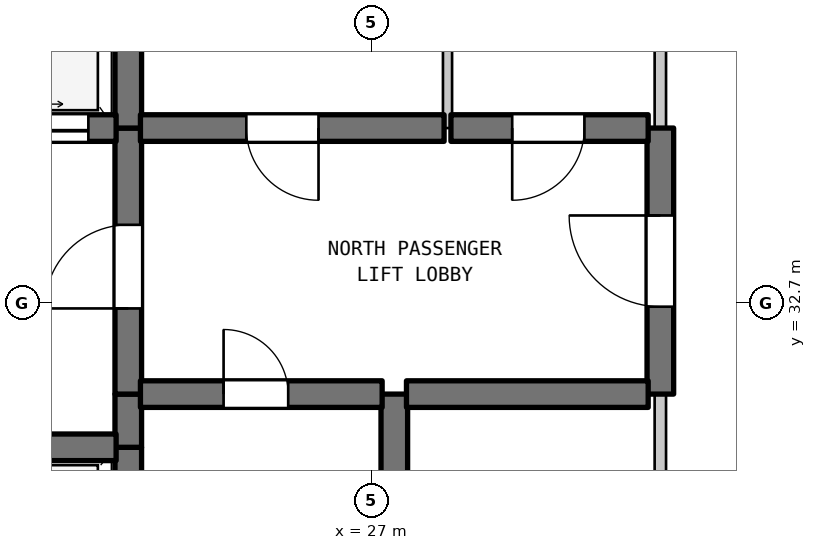
"""IFC4 building model, lengths in metres.
Left out: names, types, materials, properties, quantities, classifications, styles, units other than length and angle.
Written with IfcOpenShell. Run it as: python <this file> out.ifc"""

import sys

from ifc_helpers import new_model, si_unit, direction, frame, frame_2d, origin, place, context, subcontext, project, spatial, rectangle, extrude, element, fill, save


model = new_model("IFC4")
c1 = context("Model", 3, precision=1e-05, world=origin(), true_north=direction((0.0, 1.0)))
c2 = subcontext(c1, "Body", "Model", "MODEL_VIEW")
j1 = project(units=[si_unit("LENGTHUNIT", "METRE"), si_unit("PLANEANGLEUNIT", "RADIAN")], contexts=[c1])
p1 = place(None, origin())
s1 = spatial("IfcSite", under=j1, at=p1, CompositionType="ELEMENT")
p2 = place(p1, origin())
s2 = spatial("IfcBuilding", under=s1, at=p2, CompositionType="ELEMENT")
p3 = place(p2, frame((0.0, 0.0, 242.8)))
s3 = spatial("IfcBuildingStorey", under=s2, at=p3, CompositionType="ELEMENT", Elevation=242.8)
p4 = place(p3, frame((23.8, 28.2, 0.0), z_axis=(0.0, 0.0, 1.0), x_axis=(0.0, 1.0, 0.0)))
e1 = element("IfcWall", 1, at=p4, inside=s3, PredefinedType="SHEAR", context=c2, shape_type="SweptSolid", body=[
    extrude(rectangle(XDim=2.6, YDim=0.35, at=frame_2d((1.3, 0.0))), origin(), (0.0, 0.0, 1.0), 4.19),
])
p5 = place(p3, frame((23.8, 30.8, 0.0), z_axis=(0.0, 0.0, 1.0), x_axis=(0.0, 1.0, 0.0)))
e2 = element("IfcWall", 2, at=p5, inside=s3, PredefinedType="SHEAR", context=c2, shape_type="SweptSolid", body=[
    extrude(rectangle(XDim=0.7, YDim=0.35, at=frame_2d((0.35, 0.0))), origin(), (0.0, 0.0, 1.0), 4.19),
])
p6 = place(p3, frame((23.8, 31.5, 0.0), z_axis=(0.0, 0.0, 1.0), x_axis=(0.0, 1.0, 0.0)))
e3 = element("IfcWall", 3, at=p6, inside=s3, PredefinedType="SHEAR", context=c2, shape_type="SweptSolid", body=[
    extrude(rectangle(XDim=3.5, YDim=0.35, at=frame_2d((1.75, 0.0))), origin(), (0.0, 0.0, 1.0), 4.19),
])
p7 = place(p6, frame((1.127, 0.0, 0.0)))
e4 = element("IfcOpeningElement", 4, at=p7, cuts=e3, PredefinedType="OPENING", context=c2, shape_type="SweptSolid", body=[
    extrude(rectangle(XDim=1.1, YDim=2.15, at=frame_2d((0.55, 1.075))), frame((0.0, 0.185, 0.0), z_axis=(0.0, -1.0, 0.0), x_axis=(1.0, 0.0, 0.0)), (0.0, 0.0, 1.0), 0.37),
])
p8 = place(p3, frame((23.8, 35.0, 0.0), z_axis=(0.0, 0.0, 1.0), x_axis=(0.0, 1.0, 0.0)))
e5 = element("IfcWall", 5, at=p8, inside=s3, PredefinedType="SHEAR", context=c2, shape_type="SweptSolid", body=[
    extrude(rectangle(XDim=2.9, YDim=0.35, at=frame_2d((1.45, 0.0))), origin(), (0.0, 0.0, 1.0), 4.19),
])
p9 = place(p3, frame((27.3, 28.9, 0.0), z_axis=(0.0, 0.0, 1.0), x_axis=(0.0, 1.0, 0.0)))
e6 = element("IfcWall", 6, at=p9, inside=s3, PredefinedType="SHEAR", context=c2, shape_type="SweptSolid", body=[
    extrude(rectangle(XDim=2.6, YDim=0.35, at=frame_2d((1.3, 0.0))), origin(), (0.0, 0.0, 1.0), 4.19),
])
p10 = place(p3, frame((28.0, 35.0, 0.0), z_axis=(0.0, 0.0, 1.0), x_axis=(0.0, 1.0, 0.0)))
e7 = element("IfcWall", 7, at=p10, inside=s3, PredefinedType="PARTITIONING", context=c2, shape_type="SweptSolid", body=[
    extrude(rectangle(XDim=2.9, YDim=0.12, at=frame_2d((1.45, 0.0))), origin(), (0.0, 0.0, 1.0), 4.19),
])
p11 = place(p3, frame((30.8, 28.9, 0.0), z_axis=(0.0, 0.0, 1.0), x_axis=(0.0, 1.0, 0.0)))
e8 = element("IfcWall", 8, at=p11, inside=s3, PredefinedType="STANDARD", context=c2, shape_type="SweptSolid", body=[
    extrude(rectangle(XDim=2.6, YDim=0.15, at=frame_2d((1.3, 0.0))), origin(), (0.0, 0.0, 1.0), 4.19),
])
p12 = place(p3, frame((30.8, 31.5, 0.0), z_axis=(0.0, 0.0, 1.0), x_axis=(0.0, 1.0, 0.0)))
e9 = element("IfcWall", 9, at=p12, inside=s3, PredefinedType="SHEAR", context=c2, shape_type="SweptSolid", body=[
    extrude(rectangle(XDim=3.5, YDim=0.35, at=frame_2d((1.75, 0.0))), origin(), (0.0, 0.0, 1.0), 4.19),
])
p13 = place(p12, frame((1.15, 0.0, 0.0)))
e10 = element("IfcOpeningElement", 10, at=p13, cuts=e9, PredefinedType="OPENING", context=c2, shape_type="SweptSolid", body=[
    extrude(rectangle(XDim=1.2, YDim=2.2, at=frame_2d((0.6, 1.1))), frame((0.0, 0.185, 0.0), z_axis=(0.0, -1.0, 0.0), x_axis=(1.0, 0.0, 0.0)), (0.0, 0.0, 1.0), 0.37),
])
p14 = place(p3, frame((30.8, 35.0, 0.0), z_axis=(0.0, 0.0, 1.0), x_axis=(0.0, 1.0, 0.0)))
e11 = element("IfcWall", 11, at=p14, inside=s3, PredefinedType="STANDARD", context=c2, shape_type="SweptSolid", body=[
    extrude(rectangle(XDim=2.9, YDim=0.15, at=frame_2d((1.45, 0.0))), origin(), (0.0, 0.0, 1.0), 4.19),
])
p15 = place(p3, frame((19.16, 30.8, 0.0), z_axis=(0.0, 0.0, 1.0), x_axis=(1.0, 0.0, 0.0)))
e12 = element("IfcWall", 12, at=p15, inside=s3, PredefinedType="SHEAR", context=c2, shape_type="SweptSolid", body=[
    extrude(rectangle(XDim=4.48, YDim=0.35, at=frame_2d((2.24, 0.0))), origin(), (0.0, 0.0, 1.0), 4.19),
])
p16 = place(p3, frame((23.96, 31.5, 0.0), z_axis=(0.0, 0.0, 1.0), x_axis=(1.0, 0.0, 0.0)))
e13 = element("IfcWall", 13, at=p16, inside=s3, PredefinedType="SHEAR", context=c2, shape_type="SweptSolid", body=[
    extrude(rectangle(XDim=3.18, YDim=0.35, at=frame_2d((1.59, 0.0))), origin(), (0.0, 0.0, 1.0), 4.19),
])
p17 = place(p16, frame((1.094, 0.0, 0.0)))
e14 = element("IfcOpeningElement", 14, at=p17, cuts=e13, PredefinedType="OPENING", context=c2, shape_type="SweptSolid", body=[
    extrude(rectangle(XDim=0.85, YDim=2.1, at=frame_2d((0.425, 1.05))), frame((0.0, 0.185, 0.0), z_axis=(0.0, -1.0, 0.0), x_axis=(1.0, 0.0, 0.0)), (0.0, 0.0, 1.0), 0.37),
])
p18 = place(p3, frame((27.46, 31.5, 0.0), z_axis=(0.0, 0.0, 1.0), x_axis=(1.0, 0.0, 0.0)))
e15 = element("IfcWall", 15, at=p18, inside=s3, PredefinedType="SHEAR", context=c2, shape_type="SweptSolid", body=[
    extrude(rectangle(XDim=3.18, YDim=0.35, at=frame_2d((1.59, 0.0))), origin(), (0.0, 0.0, 1.0), 4.19),
])
p19 = place(p3, frame((19.16, 35.0, 0.0), z_axis=(0.0, 0.0, 1.0), x_axis=(1.0, 0.0, 0.0)))
e16 = element("IfcWall", 16, at=p19, inside=s3, PredefinedType="SHEAR", context=c2, shape_type="SweptSolid", body=[
    extrude(rectangle(XDim=4.48, YDim=0.35, at=frame_2d((2.24, 0.0))), origin(), (0.0, 0.0, 1.0), 4.19),
])
p20 = place(p19, frame((0.365, 0.0, 0.0)))
e17 = element("IfcOpeningElement", 17, at=p20, cuts=e16, PredefinedType="OPENING", context=c2, shape_type="SweptSolid", body=[
    extrude(rectangle(XDim=1.35, YDim=2.2, at=frame_2d((0.675, 1.1))), frame((0.0, 0.185, 0.0), z_axis=(0.0, -1.0, 0.0), x_axis=(1.0, 0.0, 0.0)), (0.0, 0.0, 1.0), 0.37),
])
p21 = place(p19, frame((2.765, 0.0, 0.0)))
e18 = element("IfcOpeningElement", 18, at=p21, cuts=e16, PredefinedType="OPENING", context=c2, shape_type="SweptSolid", body=[
    extrude(rectangle(XDim=1.35, YDim=2.2, at=frame_2d((0.675, 1.1))), frame((0.0, 0.185, 0.0), z_axis=(0.0, -1.0, 0.0), x_axis=(1.0, 0.0, 0.0)), (0.0, 0.0, 1.0), 0.37),
])
p22 = place(p3, frame((23.96, 35.0, 0.0), z_axis=(0.0, 0.0, 1.0), x_axis=(1.0, 0.0, 0.0)))
e19 = element("IfcWall", 19, at=p22, inside=s3, PredefinedType="SHEAR", context=c2, shape_type="SweptSolid", body=[
    extrude(rectangle(XDim=3.995, YDim=0.35, at=frame_2d((1.998, 0.0))), origin(), (0.0, 0.0, 1.0), 4.19),
])
p23 = place(p22, frame((1.393, 0.0, 0.0)))
e20 = element("IfcOpeningElement", 20, at=p23, cuts=e19, PredefinedType="OPENING", context=c2, shape_type="SweptSolid", body=[
    extrude(rectangle(XDim=0.95, YDim=2.15, at=frame_2d((0.475, 1.075))), frame((0.0, 0.185, 0.0), z_axis=(0.0, -1.0, 0.0), x_axis=(1.0, 0.0, 0.0)), (0.0, 0.0, 1.0), 0.37),
])
p24 = place(p3, frame((28.045, 35.0, 0.0), z_axis=(0.0, 0.0, 1.0), x_axis=(1.0, 0.0, 0.0)))
e21 = element("IfcWall", 21, at=p24, inside=s3, PredefinedType="SHEAR", context=c2, shape_type="SweptSolid", body=[
    extrude(rectangle(XDim=2.595, YDim=0.35, at=frame_2d((1.297, 0.0))), origin(), (0.0, 0.0, 1.0), 4.19),
])
p25 = place(p24, frame((0.806, 0.0, 0.0)))
e22 = element("IfcOpeningElement", 22, at=p25, cuts=e21, PredefinedType="OPENING", context=c2, shape_type="SweptSolid", body=[
    extrude(rectangle(XDim=0.95, YDim=2.15, at=frame_2d((0.475, 1.075))), frame((0.0, 0.185, 0.0), z_axis=(0.0, -1.0, 0.0), x_axis=(1.0, 0.0, 0.0)), (0.0, 0.0, 1.0), 0.37),
])
p26 = place(p7, origin())
e23 = element("IfcDoor", 23, at=p26, inside=s3, OperationType="SINGLE_SWING_LEFT", PredefinedType="DOOR", context=c2, shape_type="SweptSolid", body=[
    extrude(rectangle(XDim=1.1, YDim=2.15, at=frame_2d((0.55, 1.075))), frame((0.0, 0.025, 0.0), z_axis=(0.0, -1.0, 0.0), x_axis=(1.0, 0.0, 0.0)), (0.0, 0.0, 1.0), 0.05),
])
fill(e4, e23)
p27 = place(p13, origin())
e24 = element("IfcDoor", 24, at=p27, inside=s3, OperationType="SINGLE_SWING_RIGHT", PredefinedType="DOOR", context=c2, shape_type="SweptSolid", body=[
    extrude(rectangle(XDim=1.2, YDim=2.2, at=frame_2d((0.6, 1.1))), frame((0.0, 0.025, 0.0), z_axis=(0.0, -1.0, 0.0), x_axis=(1.0, 0.0, 0.0)), (0.0, 0.0, 1.0), 0.05),
])
fill(e10, e24)
p28 = place(p17, origin())
e25 = element("IfcDoor", 25, at=p28, inside=s3, OperationType="SINGLE_SWING_LEFT", PredefinedType="DOOR", context=c2, shape_type="SweptSolid", body=[
    extrude(rectangle(XDim=0.85, YDim=2.1, at=frame_2d((0.425, 1.05))), frame((0.0, 0.025, 0.0), z_axis=(0.0, -1.0, 0.0), x_axis=(1.0, 0.0, 0.0)), (0.0, 0.0, 1.0), 0.05),
])
fill(e14, e25)
p29 = place(p21, origin())
e26 = element("IfcDoor", 26, at=p29, inside=s3, OperationType="DOUBLE_DOOR_SLIDING", PredefinedType="DOOR", context=c2, shape_type="SweptSolid", body=[
    extrude(rectangle(XDim=1.35, YDim=2.2, at=frame_2d((0.675, 1.1))), frame((0.0, 0.025, 0.0), z_axis=(0.0, -1.0, 0.0), x_axis=(1.0, 0.0, 0.0)), (0.0, 0.0, 1.0), 0.05),
])
fill(e18, e26)
p30 = place(p23, frame((0.95, 0.0, 0.0), z_axis=(0.0, 0.0, 1.0), x_axis=(-1.0, 0.0, 0.0)))
e27 = element("IfcDoor", 27, at=p30, inside=s3, OperationType="SINGLE_SWING_RIGHT", PredefinedType="DOOR", context=c2, shape_type="SweptSolid", body=[
    extrude(rectangle(XDim=0.95, YDim=2.15, at=frame_2d((0.475, 1.075))), frame((0.0, 0.025, 0.0), z_axis=(0.0, -1.0, 0.0), x_axis=(1.0, 0.0, 0.0)), (0.0, 0.0, 1.0), 0.05),
])
fill(e20, e27)
p31 = place(p25, frame((0.95, 0.0, 0.0), z_axis=(0.0, 0.0, 1.0), x_axis=(-1.0, 0.0, 0.0)))
e28 = element("IfcDoor", 28, at=p31, inside=s3, OperationType="SINGLE_SWING_LEFT", PredefinedType="DOOR", context=c2, shape_type="SweptSolid", body=[
    extrude(rectangle(XDim=0.95, YDim=2.15, at=frame_2d((0.475, 1.075))), frame((0.0, 0.025, 0.0), z_axis=(0.0, -1.0, 0.0), x_axis=(1.0, 0.0, 0.0)), (0.0, 0.0, 1.0), 0.05),
])
fill(e22, e28)
save(model, sys.argv[1])
